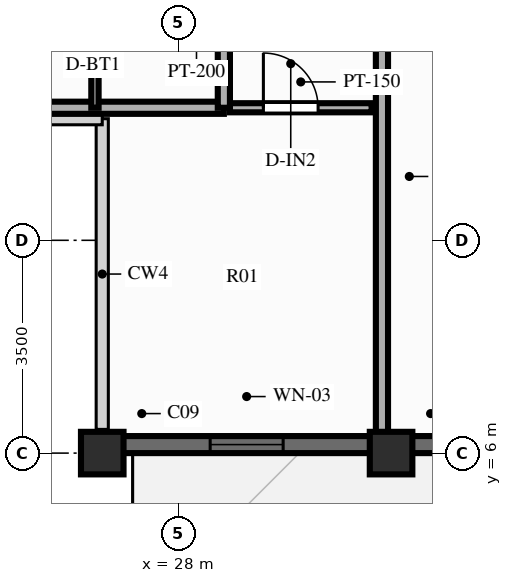
"""IFC4 building model, lengths in metres.
Left out: names, types, materials, properties, quantities, classifications, styles, units other than length and angle.
Written with IfcOpenShell. Run it as: python <this file> out.ifc"""

import sys

from ifc_helpers import new_model, si_unit, direction, frame, frame_2d, origin, origin_2d, place, context, subcontext, project, spatial, rectangle, extrude, source, transform, mapped, element, fill, save


model = new_model("IFC4")
c1 = context("Model", 3, precision=1e-05, world=origin(), true_north=direction((0.0, 1.0)))
c2 = subcontext(c1, "Body", "Model", "MODEL_VIEW")
j1 = project(units=[si_unit("LENGTHUNIT", "METRE"), si_unit("PLANEANGLEUNIT", "RADIAN")], contexts=[c1])
p1 = place(None, origin())
s1 = spatial("IfcSite", under=j1, at=p1, CompositionType="ELEMENT")
p2 = place(p1, origin())
s2 = spatial("IfcBuilding", under=s1, at=p2, CompositionType="ELEMENT")
p3 = place(p2, frame((0.0, 0.0, 236.1)))
s3 = spatial("IfcBuildingStorey", under=s2, at=p3, CompositionType="ELEMENT", Elevation=236.1)
m1 = source(origin(), c2, "Body", "SweptSolid", [
    extrude(rectangle(XDim=0.7, YDim=0.7, at=origin_2d()), origin(), (0.0, 0.0, 1.0), 3.9),
])
for number, where, z_axis, x_axis in (
    (1, (26.75, 6.0, 0.0), (0.0, 0.0, 1.0), (1.0, 0.0, 0.0)),
    (2, (31.5, 6.0, 0.0), (0.0, 0.0, 1.0), (1.0, 0.0, 0.0)),
):
    element("IfcColumn", number, at=place(p3, frame(where, z_axis=z_axis, x_axis=x_axis)), inside=s3, PredefinedType="COLUMN", context=c2, shape_type="MappedRepresentation", body=[
        mapped(m1, transform((0.0, 0.0, 0.0), scale=1.0)),
    ])
p4 = place(p3, frame((26.75, 6.14, 0.0), z_axis=(0.0, 0.0, 1.0), x_axis=(1.0, 0.0, 0.0)))
e3 = element("IfcWall", 3, at=p4, inside=s3, PredefinedType="SOLIDWALL", context=c2, shape_type="SweptSolid", body=[
    extrude(rectangle(XDim=22.5, YDim=0.28, at=frame_2d((11.25, 0.0))), origin(), (0.0, 0.0, 1.0), 2.44),
])
p5 = place(p4, frame((1.775, 0.0, 0.25)))
e4 = element("IfcOpeningElement", 4, at=p5, cuts=e3, PredefinedType="OPENING", context=c2, shape_type="SweptSolid", body=[
    extrude(rectangle(XDim=1.2, YDim=1.5, at=frame_2d((0.6, 0.75))), frame((0.0, 0.152, 0.0), z_axis=(0.0, -1.0, 0.0), x_axis=(1.0, 0.0, 0.0)), (0.0, 0.0, 1.0), 0.304),
])
p6 = place(p4, frame((5.595, 0.0, 0.25)))
e5 = element("IfcOpeningElement", 5, at=p6, cuts=e3, PredefinedType="OPENING", context=c2, shape_type="SweptSolid", body=[
    extrude(rectangle(XDim=1.2, YDim=1.5, at=frame_2d((0.6, 0.75))), frame((0.0, 0.152, 0.0), z_axis=(0.0, -1.0, 0.0), x_axis=(1.0, 0.0, 0.0)), (0.0, 0.0, 1.0), 0.304),
])
p7 = place(p4, frame((8.75, 0.0, 0.25)))
e6 = element("IfcOpeningElement", 6, at=p7, cuts=e3, PredefinedType="OPENING", context=c2, shape_type="SweptSolid", body=[
    extrude(rectangle(XDim=1.2, YDim=1.5, at=frame_2d((0.6, 0.75))), frame((0.0, 0.152, 0.0), z_axis=(0.0, -1.0, 0.0), x_axis=(1.0, 0.0, 0.0)), (0.0, 0.0, 1.0), 0.304),
])
p8 = place(p4, frame((13.7, 0.0, 0.0), z_axis=(0.0, 0.0, 1.0), x_axis=(-1.0, 0.0, 0.0)))
e7 = element("IfcOpeningElement", 7, at=p8, cuts=e3, PredefinedType="OPENING", context=c2, shape_type="SweptSolid", body=[
    extrude(rectangle(XDim=1.1, YDim=2.15, at=frame_2d((0.55, 1.075))), frame((0.0, 0.152, 0.0), z_axis=(0.0, -1.0, 0.0), x_axis=(1.0, 0.0, 0.0)), (0.0, 0.0, 1.0), 0.304),
])
p9 = place(p4, frame((15.705, 0.0, 0.25)))
e8 = element("IfcOpeningElement", 8, at=p9, cuts=e3, PredefinedType="OPENING", context=c2, shape_type="SweptSolid", body=[
    extrude(rectangle(XDim=1.2, YDim=1.5, at=frame_2d((0.6, 0.75))), frame((0.0, 0.152, 0.0), z_axis=(0.0, -1.0, 0.0), x_axis=(1.0, 0.0, 0.0)), (0.0, 0.0, 1.0), 0.304),
])
p10 = place(p4, frame((19.525, 0.0, 0.25)))
e9 = element("IfcOpeningElement", 9, at=p10, cuts=e3, PredefinedType="OPENING", context=c2, shape_type="SweptSolid", body=[
    extrude(rectangle(XDim=1.2, YDim=1.5, at=frame_2d((0.6, 0.75))), frame((0.0, 0.152, 0.0), z_axis=(0.0, -1.0, 0.0), x_axis=(1.0, 0.0, 0.0)), (0.0, 0.0, 1.0), 0.304),
])
p11 = place(p3, frame((28.85, 11.68, 0.0), z_axis=(0.0, 0.0, 1.0), x_axis=(1.0, 0.0, 0.0)))
e10 = element("IfcWall", 10, at=p11, inside=s3, PredefinedType="PARTITIONING", context=c2, shape_type="SweptSolid", body=[
    extrude(rectangle(XDim=2.33, YDim=0.15, at=frame_2d((1.165, 0.0))), origin(), (0.0, 0.0, 1.0), 2.24),
])
p12 = place(p11, frame((0.55, 0.0, 0.0)))
e11 = element("IfcOpeningElement", 11, at=p12, cuts=e10, PredefinedType="OPENING", context=c2, shape_type="SweptSolid", body=[
    extrude(rectangle(XDim=0.9, YDim=2.1, at=frame_2d((0.45, 1.05))), frame((0.0, 0.087, 0.0), z_axis=(0.0, -1.0, 0.0), x_axis=(1.0, 0.0, 0.0)), (0.0, 0.0, 1.0), 0.174),
])
p13 = place(p3, frame((31.35, 14.95, 0.0), z_axis=(0.0, 0.0, 1.0), x_axis=(0.0, -1.0, 0.0)))
e12 = element("IfcWall", 12, at=p13, inside=s3, PredefinedType="PARTITIONING", context=c2, shape_type="SweptSolid", body=[
    extrude(rectangle(XDim=8.8, YDim=0.2, at=frame_2d((4.4, 0.0))), origin(), (0.0, 0.0, 1.0), 2.44),
])
p14 = place(p3, frame((28.75, 11.68, 0.0), z_axis=(0.0, 0.0, 1.0), x_axis=(-1.0, 0.0, 0.0)))
e13 = element("IfcWall", 13, at=p14, inside=s3, PredefinedType="PARTITIONING", context=c2, shape_type="SweptSolid", body=[
    extrude(rectangle(XDim=7.35, YDim=0.2, at=frame_2d((3.675, 0.0))), origin(), (0.0, 0.0, 1.0), 2.24),
])
p15 = place(p3, frame((28.75, 11.68, 0.0), z_axis=(0.0, 0.0, 1.0), x_axis=(0.0, 1.0, 0.0)))
e14 = element("IfcWall", 14, at=p15, inside=s3, PredefinedType="PARTITIONING", context=c2, shape_type="SweptSolid", body=[
    extrude(rectangle(XDim=2.231, YDim=0.2, at=frame_2d((1.115, 0.0))), origin(), (0.0, 0.0, 1.0), 2.24),
])
p16 = place(p3, frame((26.63, 11.68, 0.0), z_axis=(0.0, 0.0, 1.0), x_axis=(0.0, 1.0, 0.0)))
e15 = element("IfcWall", 15, at=p16, inside=s3, PredefinedType="PARTITIONING", context=c2, shape_type="SweptSolid", body=[
    extrude(rectangle(XDim=2.231, YDim=0.12, at=frame_2d((1.115, 0.0))), origin(), (0.0, 0.0, 1.0), 3.56),
])
m2 = source(origin(), c2, "Body", "SweptSolid", [
    extrude(rectangle(XDim=1.2, YDim=1.5, at=frame_2d((0.6, 0.75))), frame((0.0, 0.03, 0.0), z_axis=(0.0, -1.0, 0.0), x_axis=(1.0, 0.0, 0.0)), (0.0, 0.0, 1.0), 0.06),
])
p17 = place(p5, origin())
e16 = element("IfcWindow", 16, at=p17, inside=s3, PartitioningType="SINGLE_PANEL", PredefinedType="WINDOW", context=c2, shape_type="MappedRepresentation", body=[
    mapped(m2, transform((0.0, 0.0, 0.0), scale=1.0)),
])
fill(e4, e16)
m3 = source(origin(), c2, "Body", "SweptSolid", [
    extrude(rectangle(XDim=0.9, YDim=2.1, at=frame_2d((0.45, 1.05))), frame((0.0, 0.025, 0.0), z_axis=(0.0, -1.0, 0.0), x_axis=(1.0, 0.0, 0.0)), (0.0, 0.0, 1.0), 0.05),
])
p18 = place(p12, origin())
e17 = element("IfcDoor", 17, at=p18, inside=s3, OperationType="SINGLE_SWING_LEFT", PredefinedType="DOOR", context=c2, shape_type="MappedRepresentation", body=[
    mapped(m3, transform((0.0, 0.0, 0.0), scale=1.0)),
])
fill(e11, e17)
save(model, sys.argv[1])
